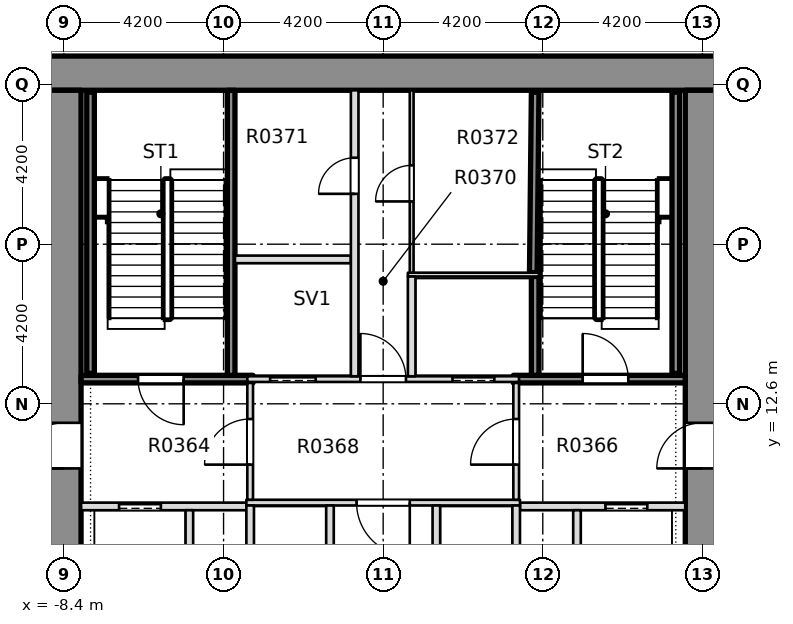
"""IFC4 building model, lengths in metres.
Left out: names, types, materials, properties, quantities, classifications, styles, units other than length and angle.
Written with IfcOpenShell. Run it as: python <this file> out.ifc"""

import sys

from ifc_helpers import new_model, si_unit, direction, frame, frame_2d, origin, place, context, subcontext, project, spatial, rectangle, extrude, element, fill, save


model = new_model("IFC4")
c1 = context("Model", 3, precision=1e-05, world=origin(), true_north=direction((0.0, 1.0)))
c2 = subcontext(c1, "Body", "Model", "MODEL_VIEW")
j1 = project(units=[si_unit("LENGTHUNIT", "METRE"), si_unit("PLANEANGLEUNIT", "RADIAN")], contexts=[c1])
p1 = place(None, origin())
s1 = spatial("IfcSite", under=j1, at=p1, CompositionType="ELEMENT")
p2 = place(p1, origin())
s2 = spatial("IfcBuilding", under=s1, at=p2, CompositionType="ELEMENT")
p3 = place(p2, frame((0.0, 0.0, 20.0)))
s3 = spatial("IfcBuildingStorey", under=s2, at=p3, CompositionType="ELEMENT", Elevation=20.0)
p4 = place(p3, frame((-11.7, 21.3, -0.4), z_axis=(0.0, 0.0, 1.0), x_axis=(1.0, 0.0, 0.0)))
e1 = element("IfcWall", 1, at=p4, inside=s3, PredefinedType="SOLIDWALL", context=c2, shape_type="SweptSolid", body=[
    extrude(rectangle(XDim=23.4, YDim=0.9, at=frame_2d((11.7, 0.0))), origin(), (0.0, 0.0, 1.0), 5.0),
])
p5 = place(p3, frame((-8.4, -7.5, -0.4), z_axis=(0.0, 0.0, 1.0), x_axis=(0.0, 1.0, 0.0)))
e2 = element("IfcWall", 2, at=p5, inside=s3, PredefinedType="SHEAR", context=c2, shape_type="SweptSolid", body=[
    extrude(rectangle(XDim=28.35, YDim=0.9, at=frame_2d((14.175, 0.0))), origin(), (0.0, 0.0, 1.0), 5.0),
])
p6 = place(p5, frame((18.4, 0.0, 0.4)))
e3 = element("IfcOpeningElement", 3, at=p6, cuts=e2, PredefinedType="OPENING", context=c2, shape_type="SweptSolid", body=[
    extrude(rectangle(XDim=1.2, YDim=2.1, at=frame_2d((0.6, 1.05))), frame((0.0, 0.46, 0.0), z_axis=(0.0, -1.0, 0.0), x_axis=(1.0, 0.0, 0.0)), (0.0, 0.0, 1.0), 0.92),
])
p7 = place(p3, frame((8.4, -7.5, -0.4), z_axis=(0.0, 0.0, 1.0), x_axis=(0.0, 1.0, 0.0)))
e4 = element("IfcWall", 4, at=p7, inside=s3, PredefinedType="SHEAR", context=c2, shape_type="SweptSolid", body=[
    extrude(rectangle(XDim=28.35, YDim=0.9, at=frame_2d((14.175, 0.0))), origin(), (0.0, 0.0, 1.0), 5.0),
])
p8 = place(p7, frame((18.4, 0.0, 0.4)))
e5 = element("IfcOpeningElement", 5, at=p8, cuts=e4, PredefinedType="OPENING", context=c2, shape_type="SweptSolid", body=[
    extrude(rectangle(XDim=1.2, YDim=2.1, at=frame_2d((0.6, 1.05))), frame((0.0, 0.46, 0.0), z_axis=(0.0, -1.0, 0.0), x_axis=(1.0, 0.0, 0.0)), (0.0, 0.0, 1.0), 0.92),
])
p9 = place(p3, frame((-7.949, 9.9, 0.0), z_axis=(0.0, 0.0, 1.0), x_axis=(1.0, 0.0, 0.0)))
e6 = element("IfcWall", 6, at=p9, inside=s3, PredefinedType="PARTITIONING", context=c2, shape_type="SweptSolid", body=[
    extrude(rectangle(XDim=4.349, YDim=0.2, at=frame_2d((2.174, 0.0))), origin(), (0.0, 0.0, 1.0), 4.6),
])
p10 = place(p9, frame((0.999, 0.0, 0.0)))
e7 = element("IfcOpeningElement", 7, at=p10, cuts=e6, PredefinedType="OPENING", context=c2, shape_type="SweptSolid", body=[
    extrude(rectangle(XDim=1.1, YDim=2.1, at=frame_2d((0.55, 1.05))), frame((0.0, 0.11, 0.0), z_axis=(0.0, -1.0, 0.0), x_axis=(1.0, 0.0, 0.0)), (0.0, 0.0, 1.0), 0.22),
])
p11 = place(p3, frame((3.6, 9.9, 0.0), z_axis=(0.0, 0.0, 1.0), x_axis=(1.0, 0.0, 0.0)))
e8 = element("IfcWall", 8, at=p11, inside=s3, PredefinedType="PARTITIONING", context=c2, shape_type="SweptSolid", body=[
    extrude(rectangle(XDim=4.349, YDim=0.2, at=frame_2d((2.174, 0.0))), origin(), (0.0, 0.0, 1.0), 4.6),
])
p12 = place(p11, frame((2.25, 0.0, 0.0)))
e9 = element("IfcOpeningElement", 9, at=p12, cuts=e8, PredefinedType="OPENING", context=c2, shape_type="SweptSolid", body=[
    extrude(rectangle(XDim=1.1, YDim=2.1, at=frame_2d((0.55, 1.05))), frame((0.0, 0.11, 0.0), z_axis=(0.0, -1.0, 0.0), x_axis=(1.0, 0.0, 0.0)), (0.0, 0.0, 1.0), 0.22),
])
p13 = place(p3, frame((-3.6, 10.0, 0.0), z_axis=(0.0, 0.0, 1.0), x_axis=(1.0, 0.0, 0.0)))
e10 = element("IfcWall", 10, at=p13, inside=s3, PredefinedType="PARTITIONING", context=c2, shape_type="SweptSolid", body=[
    extrude(rectangle(XDim=7.2, YDim=0.15, at=frame_2d((3.6, 0.0))), origin(), (0.0, 0.0, 1.0), 4.6),
])
p14 = place(p13, frame((2.9, 0.0, 0.0)))
e11 = element("IfcOpeningElement", 11, at=p14, cuts=e10, PredefinedType="OPENING", context=c2, shape_type="SweptSolid", body=[
    extrude(rectangle(XDim=1.4, YDim=2.1, at=frame_2d((0.7, 1.05))), frame((0.0, 0.085, 0.0), z_axis=(0.0, -1.0, 0.0), x_axis=(1.0, 0.0, 0.0)), (0.0, 0.0, 1.0), 0.17),
])
p15 = place(p3, frame((-7.949, 13.25, 0.0), z_axis=(0.0, 0.0, 1.0), x_axis=(1.0, 0.0, 0.0)))
e12 = element("IfcWall", 12, at=p15, inside=s3, PredefinedType="SOLIDWALL", context=c2, shape_type="SweptSolid", body=[
    extrude(rectangle(XDim=4.524, YDim=0.2, at=frame_2d((2.262, 0.0))), origin(), (0.0, 0.0, 1.0), 4.6),
])
p16 = place(p15, frame((1.499, 0.0, 0.0)))
e13 = element("IfcOpeningElement", 13, at=p16, cuts=e12, PredefinedType="OPENING", context=c2, shape_type="SweptSolid", body=[
    extrude(rectangle(XDim=1.2, YDim=2.1, at=frame_2d((0.6, 1.05))), frame((0.0, 0.11, 0.0), z_axis=(0.0, -1.0, 0.0), x_axis=(1.0, 0.0, 0.0)), (0.0, 0.0, 1.0), 0.22),
])
p17 = place(p3, frame((-3.575, 13.25, 0.0), z_axis=(0.0, 0.0, 1.0), x_axis=(1.0, 0.0, 0.0)))
e14 = element("IfcWall", 14, at=p17, inside=s3, PredefinedType="PARTITIONING", context=c2, shape_type="SweptSolid", body=[
    extrude(rectangle(XDim=7.15, YDim=0.15, at=frame_2d((3.575, 0.0))), origin(), (0.0, 0.0, 1.0), 4.6),
])
p18 = place(p17, frame((0.6, 0.0, 0.0)))
e15 = element("IfcOpeningElement", 15, at=p18, cuts=e14, PredefinedType="OPENING", context=c2, shape_type="SweptSolid", body=[
    extrude(rectangle(XDim=1.2, YDim=2.1, at=frame_2d((0.6, 1.05))), frame((0.0, 0.085, 0.0), z_axis=(0.0, -1.0, 0.0), x_axis=(1.0, 0.0, 0.0)), (0.0, 0.0, 1.0), 0.17),
])
p19 = place(p17, frame((5.4, 0.0, 0.0)))
e16 = element("IfcOpeningElement", 16, at=p19, cuts=e14, PredefinedType="OPENING", context=c2, shape_type="SweptSolid", body=[
    extrude(rectangle(XDim=1.1, YDim=2.1, at=frame_2d((0.55, 1.05))), frame((0.0, 0.085, 0.0), z_axis=(0.0, -1.0, 0.0), x_axis=(1.0, 0.0, 0.0)), (0.0, 0.0, 1.0), 0.17),
])
p20 = place(p17, frame((2.975, 0.0, 0.0)))
e17 = element("IfcOpeningElement", 17, at=p20, cuts=e14, PredefinedType="OPENING", context=c2, shape_type="SweptSolid", body=[
    extrude(rectangle(XDim=1.2, YDim=2.1, at=frame_2d((0.6, 1.05))), frame((0.0, 0.085, 0.0), z_axis=(0.0, -1.0, 0.0), x_axis=(1.0, 0.0, 0.0)), (0.0, 0.0, 1.0), 0.17),
])
p21 = place(p3, frame((3.425, 13.25, 0.0), z_axis=(0.0, 0.0, 1.0), x_axis=(1.0, 0.0, 0.0)))
e18 = element("IfcWall", 18, at=p21, inside=s3, PredefinedType="SOLIDWALL", context=c2, shape_type="SweptSolid", body=[
    extrude(rectangle(XDim=4.524, YDim=0.2, at=frame_2d((2.262, 0.0))), origin(), (0.0, 0.0, 1.0), 4.6),
])
p22 = place(p21, frame((1.825, 0.0, 0.0)))
e19 = element("IfcOpeningElement", 19, at=p22, cuts=e18, PredefinedType="OPENING", context=c2, shape_type="SweptSolid", body=[
    extrude(rectangle(XDim=1.2, YDim=2.1, at=frame_2d((0.6, 1.05))), frame((0.0, 0.11, 0.0), z_axis=(0.0, -1.0, 0.0), x_axis=(1.0, 0.0, 0.0)), (0.0, 0.0, 1.0), 0.22),
])
p23 = place(p3, frame((0.65, 16.0, 0.0), z_axis=(0.0, 0.0, 1.0), x_axis=(1.0, 0.0, 0.0)))
e20 = element("IfcWall", 20, at=p23, inside=s3, PredefinedType="PARTITIONING", context=c2, shape_type="SweptSolid", body=[
    extrude(rectangle(XDim=3.45, YDim=0.1, at=frame_2d((1.725, 0.0))), origin(), (0.0, 0.0, 1.0), 4.6),
])
p24 = place(p3, frame((-3.9, 16.4, 0.0), z_axis=(0.0, 0.0, 1.0), x_axis=(1.0, 0.0, 0.0)))
e21 = element("IfcWall", 21, at=p24, inside=s3, PredefinedType="PARTITIONING", context=c2, shape_type="SweptSolid", body=[
    extrude(rectangle(XDim=3.05, YDim=0.2, at=frame_2d((1.525, 0.0))), origin(), (0.0, 0.0, 1.0), 4.6),
])
p25 = place(p3, frame((-5.1, 7.075, 0.0), z_axis=(0.0, 0.0, 1.0), x_axis=(0.0, 1.0, 0.0)))
e22 = element("IfcWall", 22, at=p25, inside=s3, PredefinedType="PARTITIONING", context=c2, shape_type="SweptSolid", body=[
    extrude(rectangle(XDim=2.725, YDim=0.2, at=frame_2d((1.363, 0.0))), origin(), (0.0, 0.0, 1.0), 4.6),
])
p26 = place(p3, frame((-4.0, 13.35, 0.0), z_axis=(0.0, 0.0, 1.0), x_axis=(0.0, 1.0, 0.0)))
e23 = element("IfcWall", 23, at=p26, inside=s3, PredefinedType="SOLIDWALL", context=c2, shape_type="SweptSolid", body=[
    extrude(rectangle(XDim=7.499, YDim=0.2, at=frame_2d((3.75, 0.0))), origin(), (0.0, 0.0, 1.0), 4.6),
])
p27 = place(p3, frame((-3.5, 7.075, 0.0), z_axis=(0.0, 0.0, 1.0), x_axis=(0.0, 1.0, 0.0)))
e24 = element("IfcWall", 24, at=p27, inside=s3, PredefinedType="PARTITIONING", context=c2, shape_type="SweptSolid", body=[
    extrude(rectangle(XDim=2.85, YDim=0.2, at=frame_2d((1.425, 0.0))), origin(), (0.0, 0.0, 1.0), 4.6),
])
p28 = place(p3, frame((-3.5, 10.075, 0.0), z_axis=(0.0, 0.0, 1.0), x_axis=(0.0, 1.0, 0.0)))
e25 = element("IfcWall", 25, at=p28, inside=s3, PredefinedType="PARTITIONING", context=c2, shape_type="SweptSolid", body=[
    extrude(rectangle(XDim=3.075, YDim=0.15, at=frame_2d((1.538, 0.0))), origin(), (0.0, 0.0, 1.0), 4.6),
])
p29 = place(p28, frame((0.925, 0.0, 0.0)))
e26 = element("IfcOpeningElement", 26, at=p29, cuts=e25, PredefinedType="OPENING", context=c2, shape_type="SweptSolid", body=[
    extrude(rectangle(XDim=1.2, YDim=2.1, at=frame_2d((0.6, 1.05))), frame((0.0, 0.085, 0.0), z_axis=(0.0, -1.0, 0.0), x_axis=(1.0, 0.0, 0.0)), (0.0, 0.0, 1.0), 0.17),
])
p30 = place(p3, frame((-1.4, 7.075, 0.0), z_axis=(0.0, 0.0, 1.0), x_axis=(0.0, 1.0, 0.0)))
e27 = element("IfcWall", 27, at=p30, inside=s3, PredefinedType="PARTITIONING", context=c2, shape_type="SweptSolid", body=[
    extrude(rectangle(XDim=2.85, YDim=0.2, at=frame_2d((1.425, 0.0))), origin(), (0.0, 0.0, 1.0), 4.6),
])
p31 = place(p3, frame((-0.75, 13.325, 0.0), z_axis=(0.0, 0.0, 1.0), x_axis=(0.0, 1.0, 0.0)))
e28 = element("IfcWall", 28, at=p31, inside=s3, PredefinedType="PARTITIONING", context=c2, shape_type="SweptSolid", body=[
    extrude(rectangle(XDim=7.524, YDim=0.2, at=frame_2d((3.762, 0.0))), origin(), (0.0, 0.0, 1.0), 4.6),
])
p32 = place(p31, frame((4.8, 0.0, 0.0)))
e29 = element("IfcOpeningElement", 29, at=p32, cuts=e28, PredefinedType="OPENING", context=c2, shape_type="SweptSolid", body=[
    extrude(rectangle(XDim=0.95, YDim=2.1, at=frame_2d((0.475, 1.05))), frame((0.0, 0.11, 0.0), z_axis=(0.0, -1.0, 0.0), x_axis=(1.0, 0.0, 0.0)), (0.0, 0.0, 1.0), 0.22),
])
p33 = place(p3, frame((0.75, 13.325, 0.0), z_axis=(0.0, 0.0, 1.0), x_axis=(0.0, 1.0, 0.0)))
e30 = element("IfcWall", 30, at=p33, inside=s3, PredefinedType="PARTITIONING", context=c2, shape_type="SweptSolid", body=[
    extrude(rectangle(XDim=2.625, YDim=0.2, at=frame_2d((1.312, 0.0))), origin(), (0.0, 0.0, 1.0), 4.6),
])
p34 = place(p3, frame((0.75, 16.05, 0.0), z_axis=(0.0, 0.0, 1.0), x_axis=(0.0, 1.0, 0.0)))
e31 = element("IfcWall", 31, at=p34, inside=s3, PredefinedType="PARTITIONING", context=c2, shape_type="SweptSolid", body=[
    extrude(rectangle(XDim=4.799, YDim=0.1, at=frame_2d((2.399, 0.0))), origin(), (0.0, 0.0, 1.0), 4.6),
])
p35 = place(p34, frame((1.875, 0.0, 0.0)))
e32 = element("IfcOpeningElement", 32, at=p35, cuts=e31, PredefinedType="OPENING", context=c2, shape_type="SweptSolid", body=[
    extrude(rectangle(XDim=0.95, YDim=2.1, at=frame_2d((0.475, 1.05))), frame((0.0, 0.06, 0.0), z_axis=(0.0, -1.0, 0.0), x_axis=(1.0, 0.0, 0.0)), (0.0, 0.0, 1.0), 0.12),
])
for number, where, z_axis, x_axis in (
    (33, (1.4, 7.075, 0.0), (0.0, 0.0, 1.0), (0.0, 1.0, 0.0)),
    (34, (3.5, 7.075, 0.0), (0.0, 0.0, 1.0), (0.0, 1.0, 0.0)),
):
    element("IfcWall", number, at=place(p3, frame(where, z_axis=z_axis, x_axis=x_axis)), inside=s3, PredefinedType="PARTITIONING", context=c2, shape_type="SweptSolid", body=[
        extrude(rectangle(XDim=2.85, YDim=0.2, at=frame_2d((1.425, 0.0))), origin(), (0.0, 0.0, 1.0), 4.6),
    ])
p36 = place(p3, frame((3.5, 10.075, 0.0), z_axis=(0.0, 0.0, 1.0), x_axis=(0.0, 1.0, 0.0)))
e35 = element("IfcWall", 35, at=p36, inside=s3, PredefinedType="PARTITIONING", context=c2, shape_type="SweptSolid", body=[
    extrude(rectangle(XDim=3.075, YDim=0.15, at=frame_2d((1.538, 0.0))), origin(), (0.0, 0.0, 1.0), 4.6),
])
p37 = place(p36, frame((0.925, 0.0, 0.0)))
e36 = element("IfcOpeningElement", 36, at=p37, cuts=e35, PredefinedType="OPENING", context=c2, shape_type="SweptSolid", body=[
    extrude(rectangle(XDim=1.2, YDim=2.1, at=frame_2d((0.6, 1.05))), frame((0.0, 0.085, 0.0), z_axis=(0.0, -1.0, 0.0), x_axis=(1.0, 0.0, 0.0)), (0.0, 0.0, 1.0), 0.17),
])
p38 = place(p3, frame((4.0, 13.35, 0.0), z_axis=(0.0, 0.0, 1.0), x_axis=(0.0, 1.0, 0.0)))
e37 = element("IfcWall", 37, at=p38, inside=s3, PredefinedType="SOLIDWALL", context=c2, shape_type="SweptSolid", body=[
    extrude(rectangle(XDim=2.6, YDim=0.2, at=frame_2d((1.3, 0.0))), origin(), (0.0, 0.0, 1.0), 4.6),
])
p39 = place(p3, frame((3.95, 16.05, 0.0), z_axis=(0.0, 0.0, 1.0), x_axis=(0.010538176883, 0.999944471872, 0.0)))
e38 = element("IfcWall", 38, at=p39, inside=s3, PredefinedType="SOLIDWALL", context=c2, shape_type="SweptSolid", body=[
    extrude(rectangle(XDim=4.749, YDim=0.2, at=frame_2d((2.375, 0.0))), origin(), (0.0, 0.0, 1.0), 4.6),
])
p40 = place(p3, frame((5.1, 7.075, 0.0), z_axis=(0.0, 0.0, 1.0), x_axis=(0.0, 1.0, 0.0)))
e39 = element("IfcWall", 39, at=p40, inside=s3, PredefinedType="PARTITIONING", context=c2, shape_type="SweptSolid", body=[
    extrude(rectangle(XDim=2.725, YDim=0.2, at=frame_2d((1.363, 0.0))), origin(), (0.0, 0.0, 1.0), 4.6),
])
for number, where, z_axis, x_axis in (
    (40, (-7.7, 13.4, 0.0), (0.0, 0.0, 1.0), (0.0, 1.0, 0.0)),
    (41, (7.7, 13.4, 0.0), (0.0, 0.0, 1.0), (0.0, 1.0, 0.0)),
):
    element("IfcWall", number, at=place(p3, frame(where, z_axis=z_axis, x_axis=x_axis)), inside=s3, PredefinedType="SOLIDWALL", context=c2, shape_type="SweptSolid", body=[
        extrude(rectangle(XDim=7.4, YDim=0.2, at=frame_2d((3.7, 0.0))), origin(), (0.0, 0.0, 1.0), 4.6),
    ])
p41 = place(p16, origin())
e42 = element("IfcDoor", 42, at=p41, inside=s3, OperationType="SINGLE_SWING_LEFT", PredefinedType="DOOR", context=c2, shape_type="SweptSolid", body=[
    extrude(rectangle(XDim=1.2, YDim=2.1, at=frame_2d((0.6, 1.05))), frame((0.0, 0.025, 0.0), z_axis=(0.0, -1.0, 0.0), x_axis=(1.0, 0.0, 0.0)), (0.0, 0.0, 1.0), 0.05),
])
fill(e13, e42)
p42 = place(p10, origin())
e43 = element("IfcDoor", 43, at=p42, inside=s3, OperationType="SLIDING_TO_RIGHT", PredefinedType="DOOR", context=c2, shape_type="SweptSolid", body=[
    extrude(rectangle(XDim=1.1, YDim=2.1, at=frame_2d((0.55, 1.05))), frame((0.0, 0.025, 0.0), z_axis=(0.0, -1.0, 0.0), x_axis=(1.0, 0.0, 0.0)), (0.0, 0.0, 1.0), 0.05),
])
fill(e7, e43)
p43 = place(p22, origin())
e44 = element("IfcDoor", 44, at=p43, inside=s3, OperationType="SINGLE_SWING_RIGHT", PredefinedType="DOOR", context=c2, shape_type="SweptSolid", body=[
    extrude(rectangle(XDim=1.2, YDim=2.1, at=frame_2d((0.6, 1.05))), frame((0.0, 0.025, 0.0), z_axis=(0.0, -1.0, 0.0), x_axis=(1.0, 0.0, 0.0)), (0.0, 0.0, 1.0), 0.05),
])
fill(e19, e44)
p44 = place(p12, origin())
e45 = element("IfcDoor", 45, at=p44, inside=s3, OperationType="SLIDING_TO_LEFT", PredefinedType="DOOR", context=c2, shape_type="SweptSolid", body=[
    extrude(rectangle(XDim=1.1, YDim=2.1, at=frame_2d((0.55, 1.05))), frame((0.0, 0.025, 0.0), z_axis=(0.0, -1.0, 0.0), x_axis=(1.0, 0.0, 0.0)), (0.0, 0.0, 1.0), 0.05),
])
fill(e9, e45)
p45 = place(p14, origin())
e46 = element("IfcDoor", 46, at=p45, inside=s3, OperationType="SINGLE_SWING_RIGHT", PredefinedType="DOOR", context=c2, shape_type="SweptSolid", body=[
    extrude(rectangle(XDim=1.4, YDim=2.1, at=frame_2d((0.7, 1.05))), frame((0.0, 0.025, 0.0), z_axis=(0.0, -1.0, 0.0), x_axis=(1.0, 0.0, 0.0)), (0.0, 0.0, 1.0), 0.05),
])
fill(e11, e46)
p46 = place(p18, origin())
e47 = element("IfcDoor", 47, at=p46, inside=s3, OperationType="SLIDING_TO_RIGHT", PredefinedType="DOOR", context=c2, shape_type="SweptSolid", body=[
    extrude(rectangle(XDim=1.2, YDim=2.1, at=frame_2d((0.6, 1.05))), frame((0.0, 0.025, 0.0), z_axis=(0.0, -1.0, 0.0), x_axis=(1.0, 0.0, 0.0)), (0.0, 0.0, 1.0), 0.05),
])
fill(e15, e47)
p47 = place(p19, origin())
e48 = element("IfcDoor", 48, at=p47, inside=s3, OperationType="SLIDING_TO_LEFT", PredefinedType="DOOR", context=c2, shape_type="SweptSolid", body=[
    extrude(rectangle(XDim=1.1, YDim=2.1, at=frame_2d((0.55, 1.05))), frame((0.0, 0.025, 0.0), z_axis=(0.0, -1.0, 0.0), x_axis=(1.0, 0.0, 0.0)), (0.0, 0.0, 1.0), 0.05),
])
fill(e16, e48)
p48 = place(p20, origin())
e49 = element("IfcDoor", 49, at=p48, inside=s3, OperationType="SINGLE_SWING_RIGHT", PredefinedType="DOOR", context=c2, shape_type="SweptSolid", body=[
    extrude(rectangle(XDim=1.2, YDim=2.1, at=frame_2d((0.6, 1.05))), frame((0.0, 0.025, 0.0), z_axis=(0.0, -1.0, 0.0), x_axis=(1.0, 0.0, 0.0)), (0.0, 0.0, 1.0), 0.05),
])
fill(e17, e49)
p49 = place(p32, origin())
e50 = element("IfcDoor", 50, at=p49, inside=s3, OperationType="SINGLE_SWING_RIGHT", PredefinedType="DOOR", context=c2, shape_type="SweptSolid", body=[
    extrude(rectangle(XDim=0.95, YDim=2.1, at=frame_2d((0.475, 1.05))), frame((0.0, 0.025, 0.0), z_axis=(0.0, -1.0, 0.0), x_axis=(1.0, 0.0, 0.0)), (0.0, 0.0, 1.0), 0.05),
])
fill(e29, e50)
p50 = place(p35, origin())
e51 = element("IfcDoor", 51, at=p50, inside=s3, OperationType="SINGLE_SWING_LEFT", PredefinedType="DOOR", context=c2, shape_type="SweptSolid", body=[
    extrude(rectangle(XDim=0.95, YDim=2.1, at=frame_2d((0.475, 1.05))), frame((0.0, 0.025, 0.0), z_axis=(0.0, -1.0, 0.0), x_axis=(1.0, 0.0, 0.0)), (0.0, 0.0, 1.0), 0.05),
])
fill(e32, e51)
p51 = place(p29, origin())
e52 = element("IfcDoor", 52, at=p51, inside=s3, OperationType="SINGLE_SWING_RIGHT", PredefinedType="DOOR", context=c2, shape_type="SweptSolid", body=[
    extrude(rectangle(XDim=1.2, YDim=2.1, at=frame_2d((0.6, 1.05))), frame((0.0, 0.025, 0.0), z_axis=(0.0, -1.0, 0.0), x_axis=(1.0, 0.0, 0.0)), (0.0, 0.0, 1.0), 0.05),
])
fill(e26, e52)
p52 = place(p37, origin())
e53 = element("IfcDoor", 53, at=p52, inside=s3, OperationType="SINGLE_SWING_LEFT", PredefinedType="DOOR", context=c2, shape_type="SweptSolid", body=[
    extrude(rectangle(XDim=1.2, YDim=2.1, at=frame_2d((0.6, 1.05))), frame((0.0, 0.025, 0.0), z_axis=(0.0, -1.0, 0.0), x_axis=(1.0, 0.0, 0.0)), (0.0, 0.0, 1.0), 0.05),
])
fill(e36, e53)
p53 = place(p6, origin())
e54 = element("IfcDoor", 54, at=p53, inside=s3, OperationType="SINGLE_SWING_LEFT", PredefinedType="DOOR", context=c2, shape_type="SweptSolid", body=[
    extrude(rectangle(XDim=1.2, YDim=2.1, at=frame_2d((0.6, 1.05))), frame((0.0, 0.025, 0.0), z_axis=(0.0, -1.0, 0.0), x_axis=(1.0, 0.0, 0.0)), (0.0, 0.0, 1.0), 0.05),
])
fill(e3, e54)
p54 = place(p8, origin())
e55 = element("IfcDoor", 55, at=p54, inside=s3, OperationType="SINGLE_SWING_LEFT", PredefinedType="DOOR", context=c2, shape_type="SweptSolid", body=[
    extrude(rectangle(XDim=1.2, YDim=2.1, at=frame_2d((0.6, 1.05))), frame((0.0, 0.025, 0.0), z_axis=(0.0, -1.0, 0.0), x_axis=(1.0, 0.0, 0.0)), (0.0, 0.0, 1.0), 0.05),
])
fill(e5, e55)
save(model, sys.argv[1])
